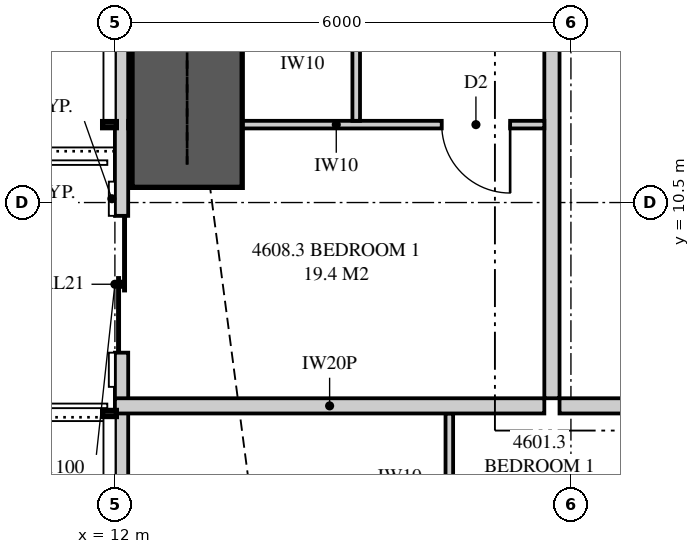
"""IFC4 building model, lengths in metres.
Left out: names, types, materials, properties, quantities, classifications, styles, units other than length and angle.
Written with IfcOpenShell. Run it as: python <this file> out.ifc"""

import sys

from ifc_helpers import new_model, si_unit, direction, frame, frame_2d, origin, place, context, subcontext, project, spatial, polyline, rectangle, outline, extrude, element, fill, save


model = new_model("IFC4")
c1 = context("Model", 3, precision=1e-05, world=origin(), true_north=direction((0.0, 1.0)))
c2 = subcontext(c1, "Body", "Model", "MODEL_VIEW")
j1 = project(units=[si_unit("LENGTHUNIT", "METRE"), si_unit("PLANEANGLEUNIT", "RADIAN")], contexts=[c1])
p1 = place(None, origin())
s1 = spatial("IfcSite", under=j1, at=p1, CompositionType="ELEMENT")
p2 = place(p1, origin())
s2 = spatial("IfcBuilding", under=s1, at=p2, CompositionType="ELEMENT")
p3 = place(p2, frame((0.0, 0.0, 171.1)))
s3 = spatial("IfcBuildingStorey", under=s2, at=p3, CompositionType="ELEMENT", Elevation=171.1)
p4 = place(p3, frame((12.087, 32.949, 0.0), z_axis=(0.0, 0.0, 1.0), x_axis=(0.0, -1.0, 0.0)))
e1 = element("IfcWall", 1, at=p4, inside=s3, PredefinedType="SOLIDWALL", context=c2, shape_type="SweptSolid", body=[
    extrude(outline(polyline([(0.0, 0.0), (29.897, 0.0), (29.897, 3.11), (20.191, 3.11), (20.191, 2.15), (20.051, 2.15), (20.051, 3.11), (19.949, 3.11), (19.949, 2.15), (7.949, 2.15), (7.949, 3.11), (7.823, 3.11), (7.823, 2.15), (7.73, 2.15), (7.73, 3.11), (0.0, 3.11), (0.0, 0.0)])), frame((0.0, 0.087, 0.0), z_axis=(0.0, -1.0, 0.0), x_axis=(1.0, 0.0, 0.0)), (0.0, 0.0, 1.0), 0.175),
])
p5 = place(p4, frame((1.297, 0.0, 0.4)))
e2 = element("IfcOpeningElement", 2, at=p5, cuts=e1, PredefinedType="OPENING", context=c2, shape_type="SweptSolid", body=[
    extrude(rectangle(XDim=1.8, YDim=1.7, at=frame_2d((0.9, 0.85))), frame((0.0, 0.097, 0.0), z_axis=(0.0, -1.0, 0.0), x_axis=(1.0, 0.0, 0.0)), (0.0, 0.0, 1.0), 0.195),
])
p6 = place(p4, frame((4.349, 0.0, 0.4)))
e3 = element("IfcOpeningElement", 3, at=p6, cuts=e1, PredefinedType="OPENING", context=c2, shape_type="SweptSolid", body=[
    extrude(rectangle(XDim=1.2, YDim=1.7, at=frame_2d((0.6, 0.85))), frame((0.0, 0.097, 0.0), z_axis=(0.0, -1.0, 0.0), x_axis=(1.0, 0.0, 0.0)), (0.0, 0.0, 1.0), 0.195),
])
p7 = place(p4, frame((11.024, 0.0, 0.4)))
e4 = element("IfcOpeningElement", 4, at=p7, cuts=e1, PredefinedType="OPENING", context=c2, shape_type="SweptSolid", body=[
    extrude(rectangle(XDim=1.8, YDim=1.7, at=frame_2d((0.9, 0.85))), frame((0.0, 0.097, 0.0), z_axis=(0.0, -1.0, 0.0), x_axis=(1.0, 0.0, 0.0)), (0.0, 0.0, 1.0), 0.195),
])
p8 = place(p4, frame((15.044, 0.0, 0.4)))
e5 = element("IfcOpeningElement", 5, at=p8, cuts=e1, PredefinedType="OPENING", context=c2, shape_type="SweptSolid", body=[
    extrude(rectangle(XDim=2.4, YDim=1.7, at=frame_2d((1.2, 0.85))), frame((0.0, 0.097, 0.0), z_axis=(0.0, -1.0, 0.0), x_axis=(1.0, 0.0, 0.0)), (0.0, 0.0, 1.0), 0.195),
])
p9 = place(p4, frame((22.624, 0.0, 0.0)))
e6 = element("IfcOpeningElement", 6, at=p9, cuts=e1, PredefinedType="OPENING", context=c2, shape_type="SweptSolid", body=[
    extrude(rectangle(XDim=1.8, YDim=2.1, at=frame_2d((0.9, 1.05))), frame((0.0, 0.097, 0.0), z_axis=(0.0, -1.0, 0.0), x_axis=(1.0, 0.0, 0.0)), (0.0, 0.0, 1.0), 0.195),
])
p10 = place(p4, frame((26.301, 0.0, 0.4)))
e7 = element("IfcOpeningElement", 7, at=p10, cuts=e1, PredefinedType="OPENING", context=c2, shape_type="SweptSolid", body=[
    extrude(rectangle(XDim=1.8, YDim=1.7, at=frame_2d((0.9, 0.85))), frame((0.0, 0.097, 0.0), z_axis=(0.0, -1.0, 0.0), x_axis=(1.0, 0.0, 0.0)), (0.0, 0.0, 1.0), 0.195),
])
p11 = place(p3, frame((17.85, 7.825, 0.0), z_axis=(0.0, 0.0, 1.0), x_axis=(1.0, 0.0, 0.0)))
e8 = element("IfcWall", 8, at=p11, inside=s3, PredefinedType="PARTITIONING", context=c2, shape_type="SweptSolid", body=[
    extrude(rectangle(XDim=3.25, YDim=0.2, at=frame_2d((1.625, 0.0))), origin(), (0.0, 0.0, 1.0), 3.11),
])
p12 = place(p11, frame((1.2, 0.0, 0.0)))
e9 = element("IfcOpeningElement", 9, at=p12, cuts=e8, PredefinedType="OPENING", context=c2, shape_type="SweptSolid", body=[
    extrude(rectangle(XDim=1.05, YDim=2.2, at=frame_2d((0.525, 1.1))), frame((0.0, 0.11, 0.0), z_axis=(0.0, -1.0, 0.0), x_axis=(1.0, 0.0, 0.0)), (0.0, 0.0, 1.0), 0.22),
])
p13 = place(p3, frame((16.4, 3.796, 0.0), z_axis=(0.0, 0.0, 1.0), x_axis=(0.0, 1.0, 0.0)))
e10 = element("IfcWall", 10, at=p13, inside=s3, PredefinedType="PARTITIONING", context=c2, shape_type="SweptSolid", body=[
    extrude(rectangle(XDim=3.929, YDim=0.1, at=frame_2d((1.964, 0.0))), origin(), (0.0, 0.0, 1.0), 3.11),
])
p14 = place(p13, frame((1.477, 0.0, 0.0)))
e11 = element("IfcOpeningElement", 11, at=p14, cuts=e10, PredefinedType="OPENING", context=c2, shape_type="SweptSolid", body=[
    extrude(rectangle(XDim=0.9, YDim=2.1, at=frame_2d((0.45, 1.05))), frame((0.0, 0.06, 0.0), z_axis=(0.0, -1.0, 0.0), x_axis=(1.0, 0.0, 0.0)), (0.0, 0.0, 1.0), 0.12),
])
p15 = place(p3, frame((12.0, 7.825, 0.0), z_axis=(0.0, 0.0, 1.0), x_axis=(1.0, 0.0, 0.0)))
e12 = element("IfcWall", 12, at=p15, inside=s3, PredefinedType="PARTITIONING", context=c2, shape_type="SweptSolid", body=[
    extrude(outline(polyline([(0.0, 0.0), (5.65, 0.0), (5.65, 3.11), (2.547, 3.11), (2.547, 2.15), (0.712, 2.15), (0.712, 3.11), (0.0, 3.11), (0.0, 0.0)])), frame((0.0, 0.1, 0.0), z_axis=(0.0, -1.0, 0.0), x_axis=(1.0, 0.0, 0.0)), (0.0, 0.0, 1.0), 0.2),
])
p16 = place(p3, frame((17.75, 7.925, 0.0), z_axis=(0.0, 0.0, 1.0), x_axis=(0.0, 1.0, 0.0)))
e13 = element("IfcWall", 13, at=p16, inside=s3, PredefinedType="PARTITIONING", context=c2, shape_type="SweptSolid", body=[
    extrude(outline(polyline([(0.0, 0.0), (14.875, 0.0), (14.875, 3.11), (5.412, 3.11), (5.412, 2.541), (4.738, 2.541), (4.738, 3.11), (0.0, 3.11), (0.0, 0.0)])), frame((0.0, 0.1, 0.0), z_axis=(0.0, -1.0, 0.0), x_axis=(1.0, 0.0, 0.0)), (0.0, 0.0, 1.0), 0.2),
])
p17 = place(p16, frame((6.938, 0.0, 0.0)))
e14 = element("IfcOpeningElement", 14, at=p17, cuts=e13, PredefinedType="OPENING", context=c2, shape_type="SweptSolid", body=[
    extrude(rectangle(XDim=1.05, YDim=2.2, at=frame_2d((0.525, 1.1))), frame((0.0, 0.11, 0.0), z_axis=(0.0, -1.0, 0.0), x_axis=(1.0, 0.0, 0.0)), (0.0, 0.0, 1.0), 0.22),
])
p18 = place(p3, frame((12.175, 11.525, 0.0), z_axis=(0.0, 0.0, 1.0), x_axis=(1.0, 0.0, 0.0)))
e15 = element("IfcWall", 15, at=p18, inside=s3, PredefinedType="PARTITIONING", context=c2, shape_type="SweptSolid", body=[
    extrude(outline(polyline([(0.101, 3.11), (0.0, 3.11), (0.0, 0.0), (0.529, 0.0), (0.529, 0.269), (1.021, 0.269), (1.021, 0.0), (5.475, 0.0), (5.475, 3.11), (1.836, 3.11), (1.836, 2.15), (1.021, 2.15), (1.021, 1.881), (0.529, 1.881), (0.529, 2.15), (0.101, 2.15), (0.101, 3.11)])), frame((0.0, 0.05, 0.0), z_axis=(0.0, -1.0, 0.0), x_axis=(1.0, 0.0, 0.0)), (0.0, 0.0, 1.0), 0.1),
])
p19 = place(p18, frame((4.125, 0.0, 0.0)))
e16 = element("IfcOpeningElement", 16, at=p19, cuts=e15, PredefinedType="OPENING", context=c2, shape_type="SweptSolid", body=[
    extrude(rectangle(XDim=0.9, YDim=2.1, at=frame_2d((0.45, 1.05))), frame((0.0, 0.06, 0.0), z_axis=(0.0, -1.0, 0.0), x_axis=(1.0, 0.0, 0.0)), (0.0, 0.0, 1.0), 0.12),
])
p20 = place(p3, frame((15.175, 11.575, 0.0), z_axis=(0.0, 0.0, 1.0), x_axis=(0.0, 1.0, 0.0)))
e17 = element("IfcWall", 17, at=p20, inside=s3, PredefinedType="PARTITIONING", context=c2, shape_type="SweptSolid", body=[
    extrude(outline(polyline([(0.0, 0.0), (2.9, 0.0), (2.9, 3.11), (1.712, 3.11), (1.712, 2.541), (1.138, 2.541), (1.138, 3.11), (0.0, 3.11), (0.0, 0.0)])), frame((0.0, 0.05, 0.0), z_axis=(0.0, -1.0, 0.0), x_axis=(1.0, 0.0, 0.0)), (0.0, 0.0, 1.0), 0.1),
])
p21 = place(p20, frame((1.0, 0.0, 0.0)))
e18 = element("IfcOpeningElement", 18, at=p21, cuts=e17, PredefinedType="OPENING", context=c2, shape_type="SweptSolid", body=[
    extrude(rectangle(XDim=0.9, YDim=2.1, at=frame_2d((0.45, 1.05))), frame((0.0, 0.06, 0.0), z_axis=(0.0, -1.0, 0.0), x_axis=(1.0, 0.0, 0.0)), (0.0, 0.0, 1.0), 0.12),
])
p22 = place(p3, frame((12.95, 10.7, 0.0), z_axis=(0.0, 0.0, 1.0), x_axis=(0.0, 1.0, 0.0)))
e19 = element("IfcWall", 19, at=p22, inside=s3, PredefinedType="SHEAR", context=c2, shape_type="SweptSolid", body=[
    extrude(rectangle(XDim=4.6, YDim=1.45, at=frame_2d((2.3, 0.0))), origin(), (0.0, 0.0, 1.0), 3.35),
])
p23 = place(p9, origin())
e20 = element("IfcDoor", 20, at=p23, inside=s3, OperationType="SLIDING_TO_LEFT", PredefinedType="DOOR", context=c2, shape_type="SweptSolid", body=[
    extrude(rectangle(XDim=1.8, YDim=2.1, at=frame_2d((0.9, 1.05))), frame((0.0, 0.025, 0.0), z_axis=(0.0, -1.0, 0.0), x_axis=(1.0, 0.0, 0.0)), (0.0, 0.0, 1.0), 0.05),
])
fill(e6, e20)
p24 = place(p19, frame((0.9, 0.0, 0.0), z_axis=(0.0, 0.0, 1.0), x_axis=(-1.0, 0.0, 0.0)))
e21 = element("IfcDoor", 21, at=p24, inside=s3, OperationType="SINGLE_SWING_LEFT", PredefinedType="DOOR", context=c2, shape_type="SweptSolid", body=[
    extrude(rectangle(XDim=0.9, YDim=2.1, at=frame_2d((0.45, 1.05))), frame((0.0, 0.025, 0.0), z_axis=(0.0, -1.0, 0.0), x_axis=(1.0, 0.0, 0.0)), (0.0, 0.0, 1.0), 0.05),
])
fill(e16, e21)
save(model, sys.argv[1])
